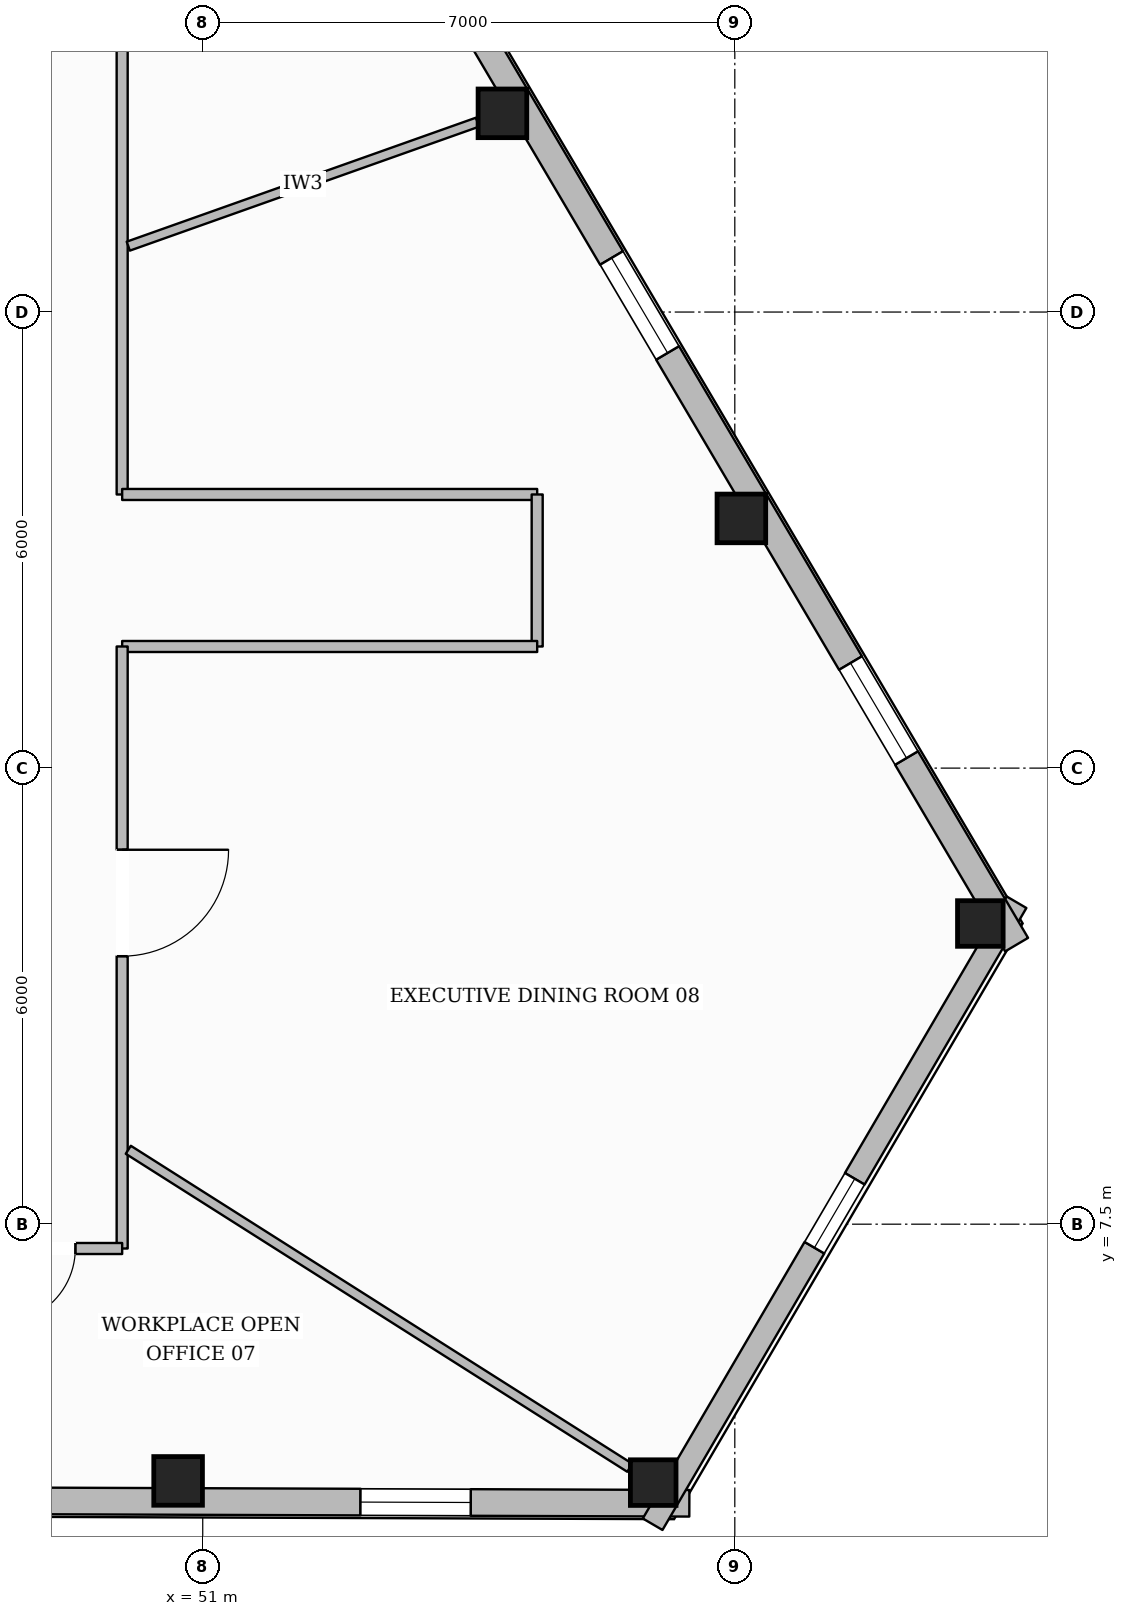
"""IFC4 building model, lengths in metres.
Left out: names, types, materials, properties, quantities, classifications, styles, units other than length and angle.
Written with IfcOpenShell. Run it as: python <this file> out.ifc"""

import sys

from ifc_helpers import new_model, si_unit, direction, frame, frame_2d, origin, origin_2d, place, context, subcontext, project, spatial, rectangle, hollow_rectangle, extrude, element, fill, save


model = new_model("IFC4")
c1 = context("Model", 3, precision=1e-05, world=origin(), true_north=direction((0.0, 1.0)))
c2 = subcontext(c1, "Body", "Model", "MODEL_VIEW")
j1 = project(units=[si_unit("LENGTHUNIT", "METRE"), si_unit("PLANEANGLEUNIT", "RADIAN")], contexts=[c1])
p1 = place(None, origin())
s1 = spatial("IfcSite", under=j1, at=p1, CompositionType="ELEMENT")
p2 = place(p1, origin())
s2 = spatial("IfcBuilding", under=s1, at=p2, CompositionType="ELEMENT")
p3 = place(p2, frame((0.0, 0.0, 199.65)))
s3 = spatial("IfcBuildingStorey", under=s2, at=p3, CompositionType="ELEMENT", Elevation=199.65)
p4 = place(p3, frame((50.676, 4.123, 0.0), z_axis=(0.0, 0.0, 1.0), x_axis=(1.0, 0.0, 0.0)))
e1 = element("IfcColumn", 1, at=p4, inside=s3, PredefinedType="COLUMN", context=c2, shape_type="SweptSolid", body=[
    extrude(hollow_rectangle(XDim=0.64, YDim=0.64, WallThickness=0.028, at=origin_2d()), origin(), (0.0, 0.0, 1.0), 3.6),
])
for number, where, z_axis, x_axis in (
    (2, (56.927, 4.1, 0.0), (0.0, 0.0, 1.0), (1.0, 0.0, 0.0)),
    (3, (61.23, 11.456, 0.0), (0.0, 0.0, 1.0), (1.0, 0.0, 0.0)),
):
    element("IfcColumn", number, at=place(p3, frame(where, z_axis=z_axis, x_axis=x_axis)), inside=s3, PredefinedType="COLUMN", context=c2, shape_type="SweptSolid", body=[
        extrude(hollow_rectangle(XDim=0.6, YDim=0.6, WallThickness=0.028, at=origin_2d()), origin(), (0.0, 0.0, 1.0), 3.6),
    ])
for number, where, z_axis, x_axis in (
    (4, (58.086, 16.785, 0.0), (0.0, 0.0, 1.0), (1.0, 0.0, 0.0)),
    (5, (54.943, 22.114, 0.0), (0.0, 0.0, 1.0), (1.0, 0.0, 0.0)),
):
    element("IfcColumn", number, at=place(p3, frame(where, z_axis=z_axis, x_axis=x_axis)), inside=s3, PredefinedType="COLUMN", context=c2, shape_type="SweptSolid", body=[
        extrude(hollow_rectangle(XDim=0.64, YDim=0.64, WallThickness=0.028, at=origin_2d()), origin(), (0.0, 0.0, 1.0), 3.6),
    ])
p5 = place(p3, frame((57.402, 3.828, 0.0), z_axis=(0.0, 0.0, 1.0), x_axis=(-0.999993611248, 0.003574557642, 0.0)))
e6 = element("IfcWall", 6, at=p5, inside=s3, PredefinedType="STANDARD", context=c2, shape_type="SweptSolid", body=[
    extrude(rectangle(XDim=38.453, YDim=0.35, at=frame_2d((19.226, 0.0))), origin(), (0.0, 0.0, 1.0), 3.132),
])
p6 = place(p5, frame((34.129, 0.0, 0.65)))
e7 = element("IfcOpeningElement", 7, at=p6, cuts=e6, PredefinedType="OPENING", context=c2, shape_type="SweptSolid", body=[
    extrude(rectangle(XDim=1.45, YDim=1.75, at=frame_2d((0.725, 0.875))), frame((0.0, 0.185, 0.0), z_axis=(0.0, -1.0, 0.0), x_axis=(1.0, 0.0, 0.0)), (0.0, 0.0, 1.0), 0.37),
])
p7 = place(p5, frame((27.879, 0.0, 0.65)))
e8 = element("IfcOpeningElement", 8, at=p7, cuts=e6, PredefinedType="OPENING", context=c2, shape_type="SweptSolid", body=[
    extrude(rectangle(XDim=1.45, YDim=1.75, at=frame_2d((0.725, 0.875))), frame((0.0, 0.185, 0.0), z_axis=(0.0, -1.0, 0.0), x_axis=(1.0, 0.0, 0.0)), (0.0, 0.0, 1.0), 0.37),
])
p8 = place(p5, frame((21.628, 0.0, 0.65)))
e9 = element("IfcOpeningElement", 9, at=p8, cuts=e6, PredefinedType="OPENING", context=c2, shape_type="SweptSolid", body=[
    extrude(rectangle(XDim=1.45, YDim=1.75, at=frame_2d((0.725, 0.875))), frame((0.0, 0.185, 0.0), z_axis=(0.0, -1.0, 0.0), x_axis=(1.0, 0.0, 0.0)), (0.0, 0.0, 1.0), 0.37),
])
p9 = place(p5, frame((9.127, 0.0, 0.65)))
e10 = element("IfcOpeningElement", 10, at=p9, cuts=e6, PredefinedType="OPENING", context=c2, shape_type="SweptSolid", body=[
    extrude(rectangle(XDim=1.45, YDim=1.75, at=frame_2d((0.725, 0.875))), frame((0.0, 0.185, 0.0), z_axis=(0.0, -1.0, 0.0), x_axis=(1.0, 0.0, 0.0)), (0.0, 0.0, 1.0), 0.37),
])
p10 = place(p5, frame((2.877, 0.0, 0.65)))
e11 = element("IfcOpeningElement", 11, at=p10, cuts=e6, PredefinedType="OPENING", context=c2, shape_type="SweptSolid", body=[
    extrude(rectangle(XDim=1.45, YDim=1.75, at=frame_2d((0.725, 0.875))), frame((0.0, 0.185, 0.0), z_axis=(0.0, -1.0, 0.0), x_axis=(1.0, 0.0, 0.0)), (0.0, 0.0, 1.0), 0.37),
])
p11 = place(p3, frame((61.707, 11.735, 0.0), z_axis=(0.0, 0.0, 1.0), x_axis=(-0.504993005477, -0.863123435216, 0.0)))
e12 = element("IfcWall", 12, at=p11, inside=s3, PredefinedType="STANDARD", context=c2, shape_type="SweptSolid", body=[
    extrude(rectangle(XDim=9.48, YDim=0.3, at=frame_2d((4.74, 0.0))), origin(), (0.0, 0.0, 1.0), 3.132),
])
p12 = place(p11, frame((4.215, 0.0, 0.65)))
e13 = element("IfcOpeningElement", 13, at=p12, cuts=e12, PredefinedType="OPENING", context=c2, shape_type="SweptSolid", body=[
    extrude(rectangle(XDim=1.05, YDim=1.7, at=frame_2d((0.525, 0.85))), frame((0.0, 0.16, 0.0), z_axis=(0.0, -1.0, 0.0), x_axis=(1.0, 0.0, 0.0)), (0.0, 0.0, 1.0), 0.32),
])
p13 = place(p3, frame((42.36, 43.976, 0.0), z_axis=(0.0, 0.0, 1.0), x_axis=(0.508076618563, -0.861311877121, 0.0)))
e14 = element("IfcWall", 14, at=p13, inside=s3, PredefinedType="STANDARD", context=c2, shape_type="SweptSolid", body=[
    extrude(rectangle(XDim=38.079, YDim=0.35, at=frame_2d((19.04, 0.0))), origin(), (0.0, 0.0, 1.0), 3.132),
])
p14 = place(p13, frame((9.12, 0.0, 0.0)))
e15 = element("IfcOpeningElement", 15, at=p14, cuts=e14, PredefinedType="OPENING", context=c2, shape_type="SweptSolid", body=[
    extrude(rectangle(XDim=1.0, YDim=2.2, at=frame_2d((0.5, 1.1))), frame((0.0, 0.185, 0.0), z_axis=(0.0, -1.0, 0.0), x_axis=(1.0, 0.0, 0.0)), (0.0, 0.0, 1.0), 0.37),
])
p15 = place(p13, frame((33.779, 0.0, 0.65)))
e16 = element("IfcOpeningElement", 16, at=p15, cuts=e14, PredefinedType="OPENING", context=c2, shape_type="SweptSolid", body=[
    extrude(rectangle(XDim=1.45, YDim=1.75, at=frame_2d((0.725, 0.875))), frame((0.0, 0.185, 0.0), z_axis=(0.0, -1.0, 0.0), x_axis=(1.0, 0.0, 0.0)), (0.0, 0.0, 1.0), 0.37),
])
p16 = place(p13, frame((27.591, 0.0, 0.65)))
e17 = element("IfcOpeningElement", 17, at=p16, cuts=e14, PredefinedType="OPENING", context=c2, shape_type="SweptSolid", body=[
    extrude(rectangle(XDim=1.45, YDim=1.75, at=frame_2d((0.725, 0.875))), frame((0.0, 0.185, 0.0), z_axis=(0.0, -1.0, 0.0), x_axis=(1.0, 0.0, 0.0)), (0.0, 0.0, 1.0), 0.37),
])
p17 = place(p13, frame((21.404, 0.0, 0.65)))
e18 = element("IfcOpeningElement", 18, at=p17, cuts=e14, PredefinedType="OPENING", context=c2, shape_type="SweptSolid", body=[
    extrude(rectangle(XDim=1.45, YDim=1.75, at=frame_2d((0.725, 0.875))), frame((0.0, 0.185, 0.0), z_axis=(0.0, -1.0, 0.0), x_axis=(1.0, 0.0, 0.0)), (0.0, 0.0, 1.0), 0.37),
])
p18 = place(p13, frame((2.842, 0.0, 0.65)))
e19 = element("IfcOpeningElement", 19, at=p18, cuts=e14, PredefinedType="OPENING", context=c2, shape_type="SweptSolid", body=[
    extrude(rectangle(XDim=1.45, YDim=1.75, at=frame_2d((0.725, 0.875))), frame((0.0, 0.185, 0.0), z_axis=(0.0, -1.0, 0.0), x_axis=(1.0, 0.0, 0.0)), (0.0, 0.0, 1.0), 0.37),
])
p19 = place(p3, frame((49.94, 25.02, 0.0), z_axis=(0.0, 0.0, 1.0), x_axis=(0.0, -1.0, 0.0)))
e20 = element("IfcWall", 20, at=p19, inside=s3, PredefinedType="PARTITIONING", context=c2, shape_type="SweptSolid", body=[
    extrude(rectangle(XDim=7.92, YDim=0.145, at=frame_2d((3.96, 0.0))), origin(), (0.0, 0.0, 1.0), 3.339),
])
p20 = place(p3, frame((49.94, 17.1, 0.0), z_axis=(0.0, 0.0, 1.0), x_axis=(1.0, 0.0, 0.0)))
e21 = element("IfcWall", 21, at=p20, inside=s3, PredefinedType="PARTITIONING", context=c2, shape_type="SweptSolid", body=[
    extrude(rectangle(XDim=5.46, YDim=0.145, at=frame_2d((2.73, 0.0))), origin(), (0.0, 0.0, 1.0), 3.6),
])
p21 = place(p3, frame((55.4, 17.1, 0.0), z_axis=(0.0, 0.0, 1.0), x_axis=(0.0, -1.0, 0.0)))
e22 = element("IfcWall", 22, at=p21, inside=s3, PredefinedType="PARTITIONING", context=c2, shape_type="SweptSolid", body=[
    extrude(rectangle(XDim=2.0, YDim=0.145, at=frame_2d((1.0, 0.0))), origin(), (0.0, 0.0, 1.0), 3.339),
])
p22 = place(p3, frame((55.4, 15.1, 0.0), z_axis=(0.0, 0.0, 1.0), x_axis=(-1.0, 0.0, 0.0)))
e23 = element("IfcWall", 23, at=p22, inside=s3, PredefinedType="PARTITIONING", context=c2, shape_type="SweptSolid", body=[
    extrude(rectangle(XDim=5.46, YDim=0.145, at=frame_2d((2.73, 0.0))), origin(), (0.0, 0.0, 1.0), 3.6),
])
p23 = place(p3, frame((49.94, 15.1, 0.0), z_axis=(0.0, 0.0, 1.0), x_axis=(0.0, -1.0, 0.0)))
e24 = element("IfcWall", 24, at=p23, inside=s3, PredefinedType="PARTITIONING", context=c2, shape_type="SweptSolid", body=[
    extrude(rectangle(XDim=7.92, YDim=0.145, at=frame_2d((3.96, 0.0))), origin(), (0.0, 0.0, 1.0), 3.6),
])
p24 = place(p23, frame((2.674, 0.0, 0.0)))
e25 = element("IfcOpeningElement", 25, at=p24, cuts=e24, PredefinedType="OPENING", context=c2, shape_type="SweptSolid", body=[
    extrude(rectangle(XDim=1.4, YDim=2.2, at=frame_2d((0.7, 1.1))), frame((0.0, 0.083, 0.0), z_axis=(0.0, -1.0, 0.0), x_axis=(1.0, 0.0, 0.0)), (0.0, 0.0, 1.0), 0.165),
])
p25 = place(p3, frame((49.94, 7.18, 0.0), z_axis=(0.0, 0.0, 1.0), x_axis=(-1.0, 0.0, 0.0)))
e26 = element("IfcWall", 26, at=p25, inside=s3, PredefinedType="PARTITIONING", context=c2, shape_type="SweptSolid", body=[
    extrude(rectangle(XDim=23.88, YDim=0.145, at=frame_2d((11.94, 0.0))), origin(), (0.0, 0.0, 1.0), 3.6),
])
p26 = place(p25, frame((18.5, 0.0, 0.0)))
e27 = element("IfcOpeningElement", 27, at=p26, cuts=e26, PredefinedType="OPENING", context=c2, shape_type="SweptSolid", body=[
    extrude(rectangle(XDim=0.88, YDim=2.1, at=frame_2d((0.44, 1.05))), frame((0.0, 0.083, 0.0), z_axis=(0.0, -1.0, 0.0), x_axis=(1.0, 0.0, 0.0)), (0.0, 0.0, 1.0), 0.165),
])
p27 = place(p25, frame((15.98, 0.0, 0.0)))
e28 = element("IfcOpeningElement", 28, at=p27, cuts=e26, PredefinedType="OPENING", context=c2, shape_type="SweptSolid", body=[
    extrude(rectangle(XDim=0.88, YDim=2.1, at=frame_2d((0.44, 1.05))), frame((0.0, 0.083, 0.0), z_axis=(0.0, -1.0, 0.0), x_axis=(1.0, 0.0, 0.0)), (0.0, 0.0, 1.0), 0.165),
])
p28 = place(p25, frame((13.52, 0.0, 0.0)))
e29 = element("IfcOpeningElement", 29, at=p28, cuts=e26, PredefinedType="OPENING", context=c2, shape_type="SweptSolid", body=[
    extrude(rectangle(XDim=0.96, YDim=2.1, at=frame_2d((0.48, 1.05))), frame((0.0, 0.083, 0.0), z_axis=(0.0, -1.0, 0.0), x_axis=(1.0, 0.0, 0.0)), (0.0, 0.0, 1.0), 0.165),
])
p29 = place(p25, frame((7.249, 0.0, 0.0)))
e30 = element("IfcOpeningElement", 30, at=p29, cuts=e26, PredefinedType="OPENING", context=c2, shape_type="SweptSolid", body=[
    extrude(rectangle(XDim=0.98, YDim=2.15, at=frame_2d((0.49, 1.075))), frame((0.0, 0.083, 0.0), z_axis=(0.0, -1.0, 0.0), x_axis=(1.0, 0.0, 0.0)), (0.0, 0.0, 1.0), 0.165),
])
p30 = place(p25, frame((0.616, 0.0, 0.0)))
e31 = element("IfcOpeningElement", 31, at=p30, cuts=e26, PredefinedType="OPENING", context=c2, shape_type="SweptSolid", body=[
    extrude(rectangle(XDim=0.98, YDim=2.15, at=frame_2d((0.49, 1.075))), frame((0.0, 0.083, 0.0), z_axis=(0.0, -1.0, 0.0), x_axis=(1.0, 0.0, 0.0)), (0.0, 0.0, 1.0), 0.165),
])
p31 = place(p3, frame((50.021, 20.367, 0.0), z_axis=(0.0, 0.0, 1.0), x_axis=(0.942385990237, 0.334527495737, 0.0)))
e32 = element("IfcWall", 32, at=p31, inside=s3, PredefinedType="PARTITIONING", context=c2, shape_type="SweptSolid", body=[
    extrude(rectangle(XDim=4.875, YDim=0.125, at=frame_2d((2.438, 0.0))), origin(), (0.0, 0.0, 1.0), 3.6),
])
p32 = place(p3, frame((50.021, 8.479, 0.0), z_axis=(0.0, 0.0, 1.0), x_axis=(0.844548219487, -0.535479509377, 0.0)))
e33 = element("IfcWall", 33, at=p32, inside=s3, PredefinedType="PARTITIONING", context=c2, shape_type="SweptSolid", body=[
    extrude(rectangle(XDim=7.812, YDim=0.125, at=frame_2d((3.906, 0.0))), origin(), (0.0, 0.0, 1.0), 3.141),
])
p33 = place(p10, origin())
e34 = element("IfcWindow", 34, at=p33, inside=s3, PartitioningType="SINGLE_PANEL", PredefinedType="WINDOW", context=c2, shape_type="SweptSolid", body=[
    extrude(rectangle(XDim=1.45, YDim=1.75, at=frame_2d((0.725, 0.875))), frame((0.0, 0.03, 0.0), z_axis=(0.0, -1.0, 0.0), x_axis=(1.0, 0.0, 0.0)), (0.0, 0.0, 1.0), 0.06),
])
fill(e11, e34)
p34 = place(p15, origin())
e35 = element("IfcWindow", 35, at=p34, inside=s3, PartitioningType="SINGLE_PANEL", PredefinedType="WINDOW", context=c2, shape_type="SweptSolid", body=[
    extrude(rectangle(XDim=1.45, YDim=1.75, at=frame_2d((0.725, 0.875))), frame((0.0, 0.03, 0.0), z_axis=(0.0, -1.0, 0.0), x_axis=(1.0, 0.0, 0.0)), (0.0, 0.0, 1.0), 0.06),
])
fill(e16, e35)
p35 = place(p16, origin())
e36 = element("IfcWindow", 36, at=p35, inside=s3, PartitioningType="SINGLE_PANEL", PredefinedType="WINDOW", context=c2, shape_type="SweptSolid", body=[
    extrude(rectangle(XDim=1.45, YDim=1.75, at=frame_2d((0.725, 0.875))), frame((0.0, 0.03, 0.0), z_axis=(0.0, -1.0, 0.0), x_axis=(1.0, 0.0, 0.0)), (0.0, 0.0, 1.0), 0.06),
])
fill(e17, e36)
p36 = place(p12, origin())
e37 = element("IfcWindow", 37, at=p36, inside=s3, PartitioningType="SINGLE_PANEL", PredefinedType="WINDOW", context=c2, shape_type="SweptSolid", body=[
    extrude(rectangle(XDim=1.05, YDim=1.7, at=frame_2d((0.525, 0.85))), frame((0.0, 0.03, 0.0), z_axis=(0.0, -1.0, 0.0), x_axis=(1.0, 0.0, 0.0)), (0.0, 0.0, 1.0), 0.06),
])
fill(e13, e37)
p37 = place(p30, origin())
e38 = element("IfcDoor", 38, at=p37, inside=s3, OperationType="SINGLE_SWING_RIGHT", PredefinedType="DOOR", context=c2, shape_type="SweptSolid", body=[
    extrude(rectangle(XDim=0.98, YDim=2.15, at=frame_2d((0.49, 1.075))), frame((0.0, 0.025, 0.0), z_axis=(0.0, -1.0, 0.0), x_axis=(1.0, 0.0, 0.0)), (0.0, 0.0, 1.0), 0.05),
])
fill(e31, e38)
p38 = place(p24, origin())
e39 = element("IfcDoor", 39, at=p38, inside=s3, OperationType="SINGLE_SWING_LEFT", PredefinedType="DOOR", context=c2, shape_type="SweptSolid", body=[
    extrude(rectangle(XDim=1.4, YDim=2.2, at=frame_2d((0.7, 1.1))), frame((0.0, 0.025, 0.0), z_axis=(0.0, -1.0, 0.0), x_axis=(1.0, 0.0, 0.0)), (0.0, 0.0, 1.0), 0.05),
])
fill(e25, e39)
save(model, sys.argv[1])
